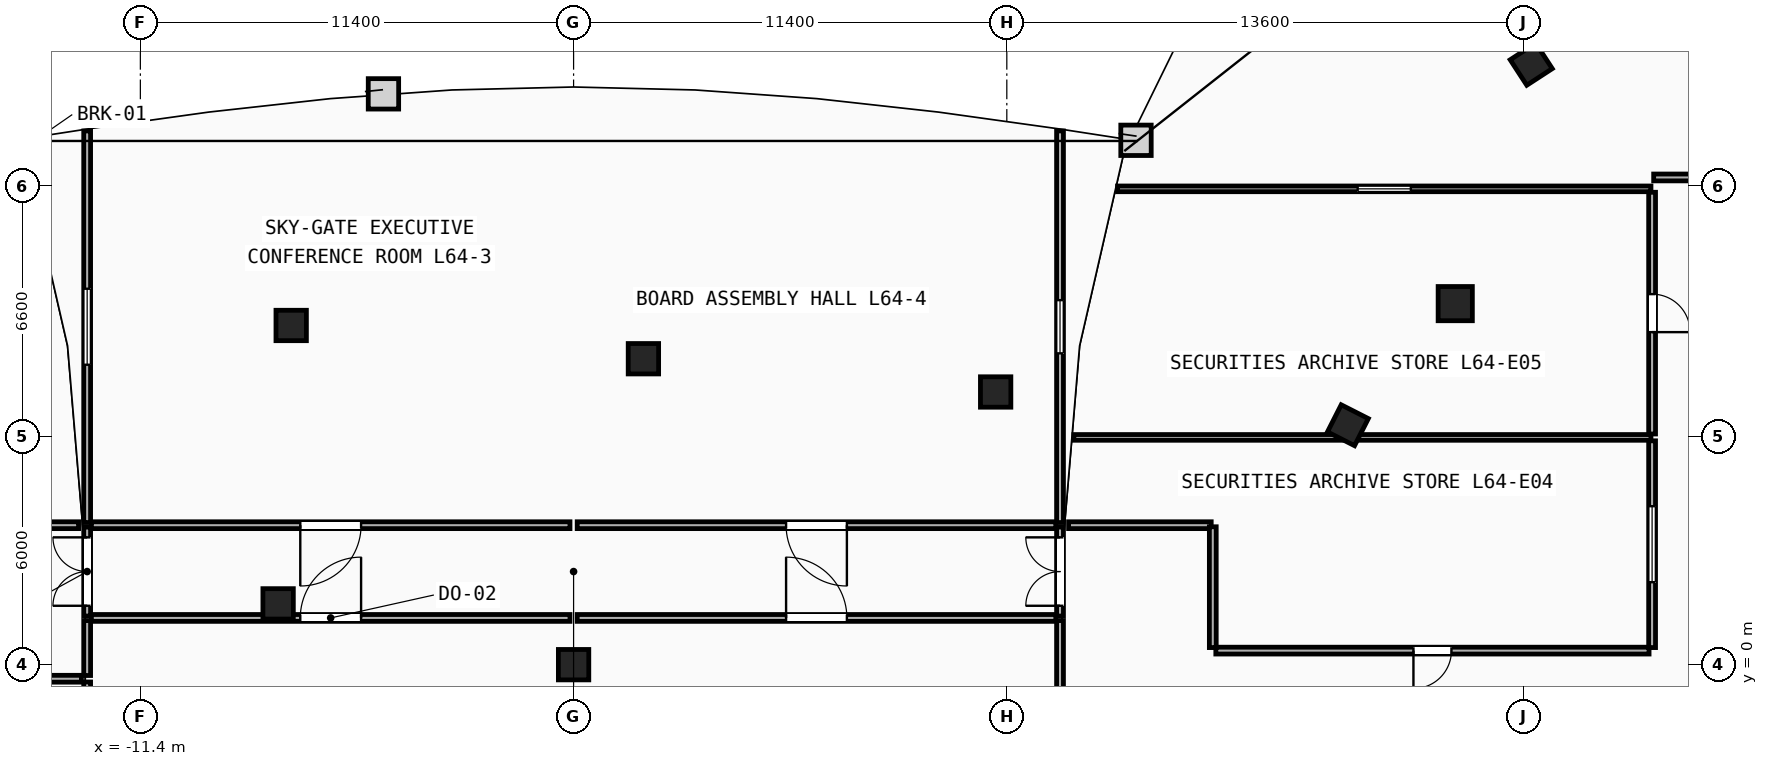
"""IFC4 building model, lengths in metres.
Left out: names, types, materials, properties, quantities, classifications, styles, units other than length and angle.
Written with IfcOpenShell. Run it as: python <this file> out.ifc"""

import sys

from ifc_helpers import new_model, si_unit, direction, frame, frame_2d, origin, origin_2d, place, context, subcontext, project, spatial, rectangle, extrude, element, fill, save


model = new_model("IFC4")
c1 = context("Model", 3, precision=1e-05, world=origin(), true_north=direction((0.0, 1.0)))
c2 = subcontext(c1, "Body", "Model", "MODEL_VIEW")
j1 = project(units=[si_unit("LENGTHUNIT", "METRE"), si_unit("PLANEANGLEUNIT", "RADIAN")], contexts=[c1])
p1 = place(None, origin())
s1 = spatial("IfcSite", under=j1, at=p1, CompositionType="ELEMENT")
p2 = place(p1, origin())
s2 = spatial("IfcBuilding", under=s1, at=p2, CompositionType="ELEMENT")
p3 = place(p2, frame((0.0, 0.0, 243.2)))
s3 = spatial("IfcBuildingStorey", under=s2, at=p3, CompositionType="ELEMENT", Elevation=243.2)
p4 = place(p3, frame((23.2, 9.5, 0.0), z_axis=(0.0, 0.0, 1.0), x_axis=(1.0, 0.0, 0.0)))
e1 = element("IfcColumn", 1, at=p4, inside=s3, PredefinedType="COLUMN", context=c2, shape_type="SweptSolid", body=[
    extrude(rectangle(XDim=0.9, YDim=0.9, at=origin_2d()), origin(), (0.0, 0.0, 1.0), 3.6),
])
for number, where, z_axis, x_axis in (
    (2, (25.2, 15.8, 0.0), (0.0, 0.0, 1.0), (-0.838, -0.546, 0.0)),
    (3, (20.375, 6.3, 0.0), (0.0, 0.0, 1.0), (-0.453, -0.892, 0.0)),
    (4, (-7.775, 1.6, 0.0), (0.0, 0.0, 1.0), (1.0, 0.0, 0.0)),
    (5, (0.0, 0.0, 0.0), (0.0, 0.0, 1.0), (1.0, 0.0, 0.0)),
    (6, (-7.431, 8.925, 0.0), (0.0, 0.0, 1.0), (1.0, 0.0, 0.0)),
    (7, (1.837, 8.05, 0.0), (0.0, 0.0, 1.0), (1.0, 0.0, 0.0)),
    (8, (11.106, 7.175, 0.0), (0.0, 0.0, 1.0), (1.0, 0.0, 0.0)),
):
    element("IfcColumn", number, at=place(p3, frame(where, z_axis=z_axis, x_axis=x_axis)), inside=s3, PredefinedType="COLUMN", context=c2, shape_type="SweptSolid", body=[
        extrude(rectangle(XDim=0.8, YDim=0.8, at=origin_2d()), origin(), (0.0, 0.0, 1.0), 3.6),
    ])
p5 = place(p3, frame((-28.3, -0.37, 0.0), z_axis=(0.0, 0.0, 1.0), x_axis=(1.0, 0.0, 0.0)))
e9 = element("IfcWall", 9, at=p5, inside=s3, PredefinedType="PARTITIONING", context=c2, shape_type="SweptSolid", body=[
    extrude(rectangle(XDim=15.349, YDim=0.18, at=frame_2d((7.675, 0.0))), origin(), (0.0, 0.0, 1.0), 3.34),
])
p6 = place(p5, frame((7.175, 0.0, 0.0)))
e10 = element("IfcOpeningElement", 10, at=p6, cuts=e9, PredefinedType="OPENING", context=c2, shape_type="SweptSolid", body=[
    extrude(rectangle(XDim=1.0, YDim=2.15, at=frame_2d((0.5, 1.075))), frame((0.0, 0.1, 0.0), z_axis=(0.0, -1.0, 0.0), x_axis=(1.0, 0.0, 0.0)), (0.0, 0.0, 1.0), 0.2),
])
p7 = place(p3, frame((-13.026, 3.67, 0.0), z_axis=(0.0, 0.0, 1.0), x_axis=(-1.0, 0.0, 0.0)))
e11 = element("IfcWall", 11, at=p7, inside=s3, PredefinedType="PARTITIONING", context=c2, shape_type="SweptSolid", body=[
    extrude(rectangle(XDim=3.753, YDim=0.18, at=frame_2d((1.876, 0.0))), origin(), (0.0, 0.0, 1.0), 3.34),
])
p8 = place(p3, frame((13.165, 5.98, 0.0), z_axis=(0.0, 0.0, 1.0), x_axis=(1.0, 0.0, 0.0)))
e12 = element("IfcWall", 12, at=p8, inside=s3, PredefinedType="PARTITIONING", context=c2, shape_type="SweptSolid", body=[
    extrude(rectangle(XDim=15.185, YDim=0.15, at=frame_2d((7.593, 0.0))), origin(), (0.0, 0.0, 1.0), 3.34),
])
p9 = place(p3, frame((14.314, 12.52, 0.0), z_axis=(0.0, 0.0, 1.0), x_axis=(1.0, 0.0, 0.0)))
e13 = element("IfcWall", 13, at=p9, inside=s3, PredefinedType="PARTITIONING", context=c2, shape_type="SweptSolid", body=[
    extrude(rectangle(XDim=14.036, YDim=0.15, at=frame_2d((7.018, 0.0))), origin(), (0.0, 0.0, 1.0), 3.34),
])
p10 = place(p9, frame((6.318, 0.0, 1.05)))
e14 = element("IfcOpeningElement", 14, at=p10, cuts=e13, PredefinedType="OPENING", context=c2, shape_type="SweptSolid", body=[
    extrude(rectangle(XDim=1.4, YDim=1.5, at=frame_2d((0.7, 0.75))), frame((0.0, 0.085, 0.0), z_axis=(0.0, -1.0, 0.0), x_axis=(1.0, 0.0, 0.0)), (0.0, 0.0, 1.0), 0.17),
])
p11 = place(p3, frame((28.3, 0.37, 0.0), z_axis=(0.0, 0.0, 1.0), x_axis=(-1.0, 0.0, 0.0)))
e15 = element("IfcWall", 15, at=p11, inside=s3, PredefinedType="PARTITIONING", context=c2, shape_type="SweptSolid", body=[
    extrude(rectangle(XDim=11.4, YDim=0.18, at=frame_2d((5.7, 0.0))), origin(), (0.0, 0.0, 1.0), 3.34),
])
p12 = place(p11, frame((5.2, 0.0, 0.0)))
e16 = element("IfcOpeningElement", 16, at=p12, cuts=e15, PredefinedType="OPENING", context=c2, shape_type="SweptSolid", body=[
    extrude(rectangle(XDim=1.0, YDim=2.15, at=frame_2d((0.5, 1.075))), frame((0.0, 0.1, 0.0), z_axis=(0.0, -1.0, 0.0), x_axis=(1.0, 0.0, 0.0)), (0.0, 0.0, 1.0), 0.2),
])
p13 = place(p3, frame((28.38, 5.89, 0.0), z_axis=(0.0, 0.0, 1.0), x_axis=(0.0, -1.0, 0.0)))
e17 = element("IfcWall", 17, at=p13, inside=s3, PredefinedType="PARTITIONING", context=c2, shape_type="SweptSolid", body=[
    extrude(rectangle(XDim=5.44, YDim=0.18, at=frame_2d((2.72, 0.0))), origin(), (0.0, 0.0, 1.0), 3.34),
])
p14 = place(p13, frame((1.72, 0.0, 1.05)))
e18 = element("IfcOpeningElement", 18, at=p14, cuts=e17, PredefinedType="OPENING", context=c2, shape_type="SweptSolid", body=[
    extrude(rectangle(XDim=2.0, YDim=1.5, at=frame_2d((1.0, 0.75))), frame((0.0, 0.1, 0.0), z_axis=(0.0, -1.0, 0.0), x_axis=(1.0, 0.0, 0.0)), (0.0, 0.0, 1.0), 0.2),
])
p15 = place(p3, frame((16.779, 3.67, 0.0), z_axis=(0.0, 0.0, 1.0), x_axis=(-1.0, 0.0, 0.0)))
e19 = element("IfcWall", 19, at=p15, inside=s3, PredefinedType="PARTITIONING", context=c2, shape_type="SweptSolid", body=[
    extrude(rectangle(XDim=3.753, YDim=0.18, at=frame_2d((1.876, 0.0))), origin(), (0.0, 0.0, 1.0), 3.34),
])
p16 = place(p3, frame((16.82, 0.45, 0.0), z_axis=(0.0, 0.0, 1.0), x_axis=(0.0, 1.0, 0.0)))
e20 = element("IfcWall", 20, at=p16, inside=s3, PredefinedType="PARTITIONING", context=c2, shape_type="SweptSolid", body=[
    extrude(rectangle(XDim=3.178, YDim=0.18, at=frame_2d((1.589, 0.0))), origin(), (0.0, 0.0, 1.0), 3.34),
])
p17 = place(p3, frame((28.38, 12.43, 0.0), z_axis=(0.0, 0.0, 1.0), x_axis=(0.0, -1.0, 0.0)))
e21 = element("IfcWall", 21, at=p17, inside=s3, PredefinedType="PARTITIONING", context=c2, shape_type="SweptSolid", body=[
    extrude(rectangle(XDim=6.36, YDim=0.18, at=frame_2d((3.18, 0.0))), origin(), (0.0, 0.0, 1.0), 3.34),
])
p18 = place(p17, frame((2.68, 0.0, 0.0)))
e22 = element("IfcOpeningElement", 22, at=p18, cuts=e21, PredefinedType="OPENING", context=c2, shape_type="SweptSolid", body=[
    extrude(rectangle(XDim=1.0, YDim=2.15, at=frame_2d((0.5, 1.075))), frame((0.0, 0.1, 0.0), z_axis=(0.0, -1.0, 0.0), x_axis=(1.0, 0.0, 0.0)), (0.0, 0.0, 1.0), 0.2),
])
p19 = place(p3, frame((30.779, 12.82, 0.0), z_axis=(0.0, 0.0, 1.0), x_axis=(-1.0, 0.0, 0.0)))
e23 = element("IfcWall", 23, at=p19, inside=s3, PredefinedType="PARTITIONING", context=c2, shape_type="SweptSolid", body=[
    extrude(rectangle(XDim=2.357, YDim=0.18, at=frame_2d((1.179, 0.0))), origin(), (0.0, 0.0, 1.0), 3.34),
])
p20 = place(p3, frame((-12.688, 1.23, 0.0), z_axis=(0.0, 0.0, 1.0), x_axis=(1.0, 0.0, 0.0)))
e24 = element("IfcWall", 24, at=p20, inside=s3, PredefinedType="PARTITIONING", context=c2, shape_type="SweptSolid", body=[
    extrude(rectangle(XDim=12.594, YDim=0.18, at=frame_2d((6.297, 0.0))), origin(), (0.0, 0.0, 1.0), 2.663),
])
p21 = place(p20, frame((5.497, 0.0, 0.0)))
e25 = element("IfcOpeningElement", 25, at=p21, cuts=e24, PredefinedType="OPENING", context=c2, shape_type="SweptSolid", body=[
    extrude(rectangle(XDim=1.6, YDim=2.2, at=frame_2d((0.8, 1.1))), frame((0.0, 0.1, 0.0), z_axis=(0.0, -1.0, 0.0), x_axis=(1.0, 0.0, 0.0)), (0.0, 0.0, 1.0), 0.2),
])
p22 = place(p3, frame((0.095, 1.23, 0.0), z_axis=(0.0, 0.0, 1.0), x_axis=(1.0, 0.0, 0.0)))
e26 = element("IfcWall", 26, at=p22, inside=s3, PredefinedType="PARTITIONING", context=c2, shape_type="SweptSolid", body=[
    extrude(rectangle(XDim=12.594, YDim=0.18, at=frame_2d((6.297, 0.0))), origin(), (0.0, 0.0, 1.0), 3.34),
])
p23 = place(p22, frame((5.497, 0.0, 0.0)))
e27 = element("IfcOpeningElement", 27, at=p23, cuts=e26, PredefinedType="OPENING", context=c2, shape_type="SweptSolid", body=[
    extrude(rectangle(XDim=1.6, YDim=2.2, at=frame_2d((0.8, 1.1))), frame((0.0, 0.1, 0.0), z_axis=(0.0, -1.0, 0.0), x_axis=(1.0, 0.0, 0.0)), (0.0, 0.0, 1.0), 0.2),
])
p24 = place(p3, frame((-0.095, 3.67, 0.0), z_axis=(0.0, 0.0, 1.0), x_axis=(-1.0, 0.0, 0.0)))
e28 = element("IfcWall", 28, at=p24, inside=s3, PredefinedType="PARTITIONING", context=c2, shape_type="SweptSolid", body=[
    extrude(rectangle(XDim=12.594, YDim=0.18, at=frame_2d((6.297, 0.0))), origin(), (0.0, 0.0, 1.0), 3.34),
])
p25 = place(p24, frame((5.497, 0.0, 0.0)))
e29 = element("IfcOpeningElement", 29, at=p25, cuts=e28, PredefinedType="OPENING", context=c2, shape_type="SweptSolid", body=[
    extrude(rectangle(XDim=1.6, YDim=2.2, at=frame_2d((0.8, 1.1))), frame((0.0, 0.1, 0.0), z_axis=(0.0, -1.0, 0.0), x_axis=(1.0, 0.0, 0.0)), (0.0, 0.0, 1.0), 0.2),
])
p26 = place(p3, frame((12.688, 3.67, 0.0), z_axis=(0.0, 0.0, 1.0), x_axis=(-1.0, 0.0, 0.0)))
e30 = element("IfcWall", 30, at=p26, inside=s3, PredefinedType="PARTITIONING", context=c2, shape_type="SweptSolid", body=[
    extrude(rectangle(XDim=12.594, YDim=0.18, at=frame_2d((6.297, 0.0))), origin(), (0.0, 0.0, 1.0), 3.34),
])
p27 = place(p26, frame((5.497, 0.0, 0.0)))
e31 = element("IfcOpeningElement", 31, at=p27, cuts=e30, PredefinedType="OPENING", context=c2, shape_type="SweptSolid", body=[
    extrude(rectangle(XDim=1.6, YDim=2.2, at=frame_2d((0.8, 1.1))), frame((0.0, 0.1, 0.0), z_axis=(0.0, -1.0, 0.0), x_axis=(1.0, 0.0, 0.0)), (0.0, 0.0, 1.0), 0.2),
])
p28 = place(p3, frame((-12.8, -14.044, 0.0), z_axis=(0.0, 0.0, 1.0), x_axis=(0.0, 1.0, 0.0)))
e32 = element("IfcWall", 32, at=p28, inside=s3, PredefinedType="PARTITIONING", context=c2, shape_type="SweptSolid", body=[
    extrude(rectangle(XDim=13.589, YDim=0.18, at=frame_2d((6.794, 0.0))), origin(), (0.0, 0.0, 1.0), 3.34),
])
p29 = place(p3, frame((-12.8, -0.285, 0.0), z_axis=(0.0, 0.0, 1.0), x_axis=(0.0, 1.0, 0.0)))
e33 = element("IfcWall", 33, at=p29, inside=s3, PredefinedType="PARTITIONING", context=c2, shape_type="SweptSolid", body=[
    extrude(rectangle(XDim=1.445, YDim=0.18, at=frame_2d((0.722, 0.0))), origin(), (0.0, 0.0, 1.0), 3.34),
])
p30 = place(p3, frame((-12.8, 3.74, 0.0), z_axis=(0.0, 0.0, 1.0), x_axis=(0.0, 1.0, 0.0)))
e34 = element("IfcWall", 34, at=p30, inside=s3, PredefinedType="PARTITIONING", context=c2, shape_type="SweptSolid", body=[
    extrude(rectangle(XDim=10.304, YDim=0.18, at=frame_2d((5.152, 0.0))), origin(), (0.0, 0.0, 1.0), 3.34),
])
p31 = place(p30, frame((4.152, 0.0, 1.05)))
e35 = element("IfcOpeningElement", 35, at=p31, cuts=e34, PredefinedType="OPENING", context=c2, shape_type="SweptSolid", body=[
    extrude(rectangle(XDim=2.0, YDim=1.5, at=frame_2d((1.0, 0.75))), frame((0.0, 0.1, 0.0), z_axis=(0.0, -1.0, 0.0), x_axis=(1.0, 0.0, 0.0)), (0.0, 0.0, 1.0), 0.2),
])
p32 = place(p3, frame((-12.8, 1.28, 0.0), z_axis=(0.0, 0.0, 1.0), x_axis=(0.0, 1.0, 0.0)))
e36 = element("IfcWall", 36, at=p32, inside=s3, PredefinedType="PARTITIONING", context=c2, shape_type="SweptSolid", body=[
    extrude(rectangle(XDim=2.34, YDim=0.18, at=frame_2d((1.17, 0.0))), origin(), (0.0, 0.0, 1.0), 3.34),
])
p33 = place(p32, frame((0.27, 0.0, 0.0)))
e37 = element("IfcOpeningElement", 37, at=p33, cuts=e36, PredefinedType="OPENING", context=c2, shape_type="SweptSolid", body=[
    extrude(rectangle(XDim=1.8, YDim=2.25, at=frame_2d((0.9, 1.125))), frame((0.0, 0.1, 0.0), z_axis=(0.0, -1.0, 0.0), x_axis=(1.0, 0.0, 0.0)), (0.0, 0.0, 1.0), 0.2),
])
p34 = place(p3, frame((12.8, -14.044, 0.0), z_axis=(0.0, 0.0, 1.0), x_axis=(0.0, 1.0, 0.0)))
e38 = element("IfcWall", 38, at=p34, inside=s3, PredefinedType="PARTITIONING", context=c2, shape_type="SweptSolid", body=[
    extrude(rectangle(XDim=15.204, YDim=0.18, at=frame_2d((7.602, 0.0))), origin(), (0.0, 0.0, 1.0), 3.34),
])
p35 = place(p34, frame((6.602, 0.0, 1.05)))
e39 = element("IfcOpeningElement", 39, at=p35, cuts=e38, PredefinedType="OPENING", context=c2, shape_type="SweptSolid", body=[
    extrude(rectangle(XDim=2.0, YDim=1.5, at=frame_2d((1.0, 0.75))), frame((0.0, 0.1, 0.0), z_axis=(0.0, -1.0, 0.0), x_axis=(1.0, 0.0, 0.0)), (0.0, 0.0, 1.0), 0.2),
])
p36 = place(p3, frame((12.8, 3.74, 0.0), z_axis=(0.0, 0.0, 1.0), x_axis=(0.0, 1.0, 0.0)))
e40 = element("IfcWall", 40, at=p36, inside=s3, PredefinedType="PARTITIONING", context=c2, shape_type="SweptSolid", body=[
    extrude(rectangle(XDim=10.304, YDim=0.18, at=frame_2d((5.152, 0.0))), origin(), (0.0, 0.0, 1.0), 3.34),
])
p37 = place(p36, frame((4.452, 0.0, 1.05)))
e41 = element("IfcOpeningElement", 41, at=p37, cuts=e40, PredefinedType="OPENING", context=c2, shape_type="SweptSolid", body=[
    extrude(rectangle(XDim=1.4, YDim=1.5, at=frame_2d((0.7, 0.75))), frame((0.0, 0.1, 0.0), z_axis=(0.0, -1.0, 0.0), x_axis=(1.0, 0.0, 0.0)), (0.0, 0.0, 1.0), 0.2),
])
p38 = place(p3, frame((12.8, 1.28, 0.0), z_axis=(0.0, 0.0, 1.0), x_axis=(0.0, 1.0, 0.0)))
e42 = element("IfcWall", 42, at=p38, inside=s3, PredefinedType="PARTITIONING", context=c2, shape_type="SweptSolid", body=[
    extrude(rectangle(XDim=2.34, YDim=0.18, at=frame_2d((1.17, 0.0))), origin(), (0.0, 0.0, 1.0), 3.34),
])
p39 = place(p38, frame((0.27, 0.0, 0.0)))
e43 = element("IfcOpeningElement", 43, at=p39, cuts=e42, PredefinedType="OPENING", context=c2, shape_type="SweptSolid", body=[
    extrude(rectangle(XDim=1.8, YDim=2.25, at=frame_2d((0.9, 1.125))), frame((0.0, 0.1, 0.0), z_axis=(0.0, -1.0, 0.0), x_axis=(1.0, 0.0, 0.0)), (0.0, 0.0, 1.0), 0.2),
])
p40 = place(p21, origin())
e44 = element("IfcDoor", 44, at=p40, inside=s3, OperationType="SINGLE_SWING_RIGHT", PredefinedType="DOOR", context=c2, shape_type="SweptSolid", body=[
    extrude(rectangle(XDim=1.6, YDim=2.2, at=frame_2d((0.8, 1.1))), frame((0.0, 0.025, 0.0), z_axis=(0.0, -1.0, 0.0), x_axis=(1.0, 0.0, 0.0)), (0.0, 0.0, 1.0), 0.05),
])
fill(e25, e44)
p41 = place(p23, origin())
e45 = element("IfcDoor", 45, at=p41, inside=s3, OperationType="SINGLE_SWING_LEFT", PredefinedType="DOOR", context=c2, shape_type="SweptSolid", body=[
    extrude(rectangle(XDim=1.6, YDim=2.2, at=frame_2d((0.8, 1.1))), frame((0.0, 0.025, 0.0), z_axis=(0.0, -1.0, 0.0), x_axis=(1.0, 0.0, 0.0)), (0.0, 0.0, 1.0), 0.05),
])
fill(e27, e45)
p42 = place(p25, origin())
e46 = element("IfcDoor", 46, at=p42, inside=s3, OperationType="SINGLE_SWING_RIGHT", PredefinedType="DOOR", context=c2, shape_type="SweptSolid", body=[
    extrude(rectangle(XDim=1.6, YDim=2.2, at=frame_2d((0.8, 1.1))), frame((0.0, 0.025, 0.0), z_axis=(0.0, -1.0, 0.0), x_axis=(1.0, 0.0, 0.0)), (0.0, 0.0, 1.0), 0.05),
])
fill(e29, e46)
p43 = place(p27, origin())
e47 = element("IfcDoor", 47, at=p43, inside=s3, OperationType="SINGLE_SWING_LEFT", PredefinedType="DOOR", context=c2, shape_type="SweptSolid", body=[
    extrude(rectangle(XDim=1.6, YDim=2.2, at=frame_2d((0.8, 1.1))), frame((0.0, 0.025, 0.0), z_axis=(0.0, -1.0, 0.0), x_axis=(1.0, 0.0, 0.0)), (0.0, 0.0, 1.0), 0.05),
])
fill(e31, e47)
p44 = place(p12, origin())
e48 = element("IfcDoor", 48, at=p44, inside=s3, OperationType="SINGLE_SWING_RIGHT", PredefinedType="DOOR", context=c2, shape_type="SweptSolid", body=[
    extrude(rectangle(XDim=1.0, YDim=2.15, at=frame_2d((0.5, 1.075))), frame((0.0, 0.025, 0.0), z_axis=(0.0, -1.0, 0.0), x_axis=(1.0, 0.0, 0.0)), (0.0, 0.0, 1.0), 0.05),
])
fill(e16, e48)
p45 = place(p18, origin())
e49 = element("IfcDoor", 49, at=p45, inside=s3, OperationType="SINGLE_SWING_RIGHT", PredefinedType="DOOR", context=c2, shape_type="SweptSolid", body=[
    extrude(rectangle(XDim=1.0, YDim=2.15, at=frame_2d((0.5, 1.075))), frame((0.0, 0.025, 0.0), z_axis=(0.0, -1.0, 0.0), x_axis=(1.0, 0.0, 0.0)), (0.0, 0.0, 1.0), 0.05),
])
fill(e22, e49)
p46 = place(p33, origin())
e50 = element("IfcDoor", 50, at=p46, inside=s3, OperationType="DOUBLE_DOOR_SINGLE_SWING", PredefinedType="DOOR", context=c2, shape_type="SweptSolid", body=[
    extrude(rectangle(XDim=1.8, YDim=2.25, at=frame_2d((0.9, 1.125))), frame((0.0, 0.025, 0.0), z_axis=(0.0, -1.0, 0.0), x_axis=(1.0, 0.0, 0.0)), (0.0, 0.0, 1.0), 0.05),
])
fill(e37, e50)
p47 = place(p39, origin())
e51 = element("IfcDoor", 51, at=p47, inside=s3, OperationType="DOUBLE_DOOR_SINGLE_SWING", PredefinedType="DOOR", context=c2, shape_type="SweptSolid", body=[
    extrude(rectangle(XDim=1.8, YDim=2.25, at=frame_2d((0.9, 1.125))), frame((0.0, 0.025, 0.0), z_axis=(0.0, -1.0, 0.0), x_axis=(1.0, 0.0, 0.0)), (0.0, 0.0, 1.0), 0.05),
])
fill(e43, e51)
p48 = place(p10, origin())
e52 = element("IfcWindow", 52, at=p48, inside=s3, PartitioningType="SINGLE_PANEL", PredefinedType="WINDOW", context=c2, shape_type="SweptSolid", body=[
    extrude(rectangle(XDim=1.4, YDim=1.5, at=frame_2d((0.7, 0.75))), frame((0.0, 0.03, 0.0), z_axis=(0.0, -1.0, 0.0), x_axis=(1.0, 0.0, 0.0)), (0.0, 0.0, 1.0), 0.06),
])
fill(e14, e52)
p49 = place(p14, origin())
e53 = element("IfcWindow", 53, at=p49, inside=s3, PartitioningType="SINGLE_PANEL", PredefinedType="WINDOW", context=c2, shape_type="SweptSolid", body=[
    extrude(rectangle(XDim=2.0, YDim=1.5, at=frame_2d((1.0, 0.75))), frame((0.0, 0.03, 0.0), z_axis=(0.0, -1.0, 0.0), x_axis=(1.0, 0.0, 0.0)), (0.0, 0.0, 1.0), 0.06),
])
fill(e18, e53)
p50 = place(p31, origin())
e54 = element("IfcWindow", 54, at=p50, inside=s3, PartitioningType="SINGLE_PANEL", PredefinedType="WINDOW", context=c2, shape_type="SweptSolid", body=[
    extrude(rectangle(XDim=2.0, YDim=1.5, at=frame_2d((1.0, 0.75))), frame((0.0, 0.03, 0.0), z_axis=(0.0, -1.0, 0.0), x_axis=(1.0, 0.0, 0.0)), (0.0, 0.0, 1.0), 0.06),
])
fill(e35, e54)
p51 = place(p37, origin())
e55 = element("IfcWindow", 55, at=p51, inside=s3, PartitioningType="SINGLE_PANEL", PredefinedType="WINDOW", context=c2, shape_type="SweptSolid", body=[
    extrude(rectangle(XDim=1.4, YDim=1.5, at=frame_2d((0.7, 0.75))), frame((0.0, 0.03, 0.0), z_axis=(0.0, -1.0, 0.0), x_axis=(1.0, 0.0, 0.0)), (0.0, 0.0, 1.0), 0.06),
])
fill(e41, e55)
save(model, sys.argv[1])
